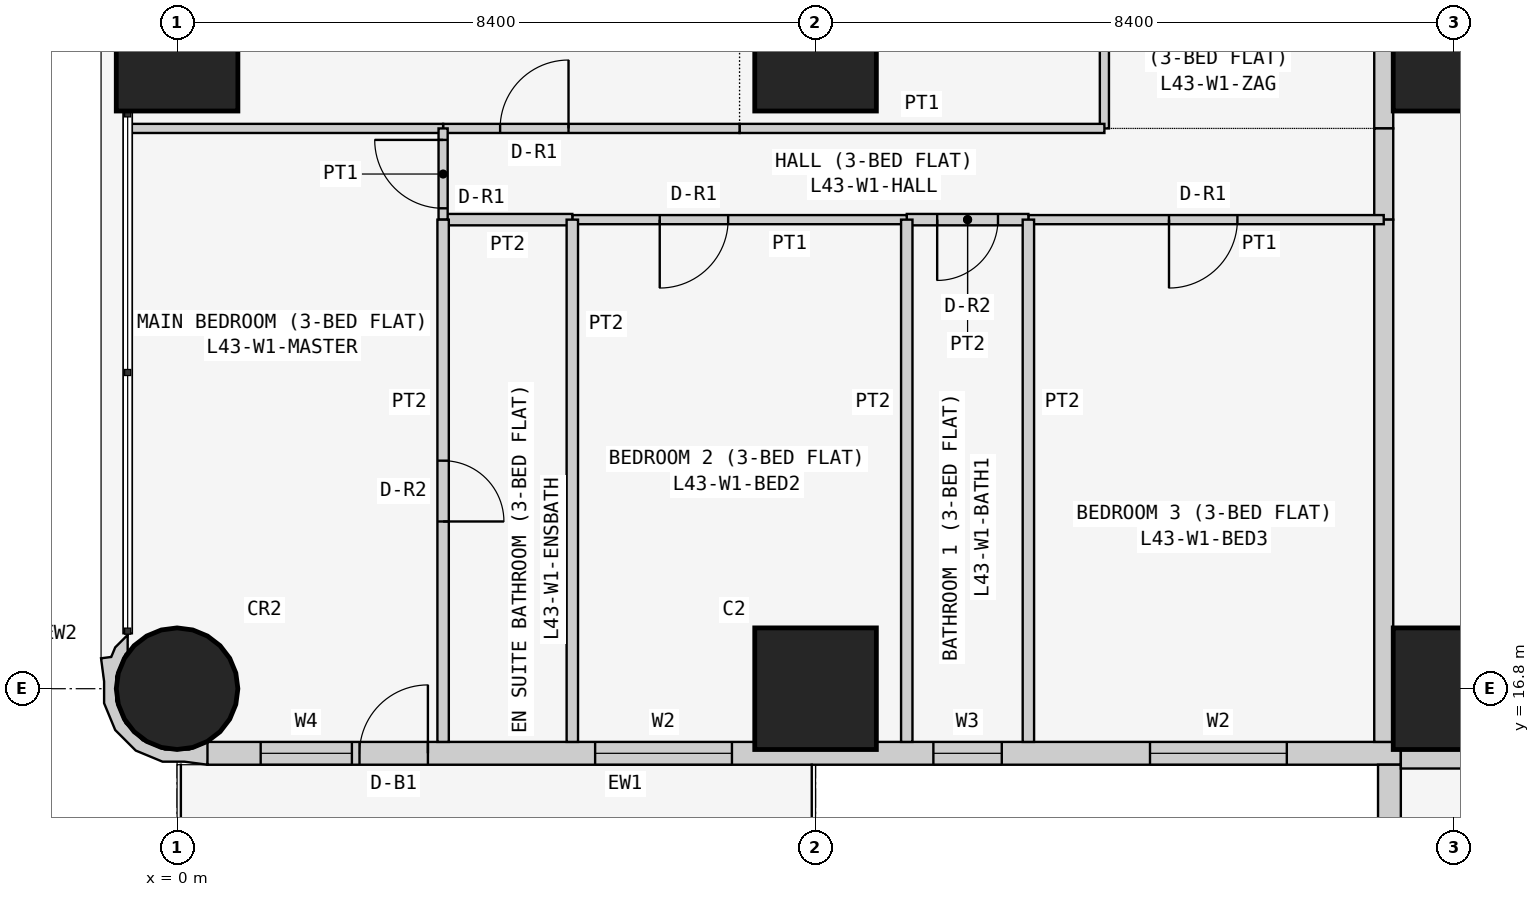
"""IFC4 building model, lengths in metres.
Left out: names, types, materials, properties, quantities, classifications, styles, units other than length and angle.
Written with IfcOpenShell. Run it as: python <this file> out.ifc"""

import sys

from ifc_helpers import new_model, si_unit, direction, frame, frame_2d, origin, origin_2d, place, context, subcontext, project, spatial, polyline, rectangle, circle, outline, extrude, element, fill, save


model = new_model("IFC4")
c1 = context("Model", 3, precision=1e-05, world=origin(), true_north=direction((0.0, 1.0)))
c2 = subcontext(c1, "Body", "Model", "MODEL_VIEW")
j1 = project(units=[si_unit("LENGTHUNIT", "METRE"), si_unit("PLANEANGLEUNIT", "RADIAN")], contexts=[c1])
p1 = place(None, origin())
s1 = spatial("IfcSite", under=j1, at=p1, CompositionType="ELEMENT")
p2 = place(p1, origin())
s2 = spatial("IfcBuilding", under=s1, at=p2, CompositionType="ELEMENT")
p3 = place(p2, frame((0.0, 0.0, 166.5)))
s3 = spatial("IfcBuildingStorey", under=s2, at=p3, CompositionType="ELEMENT", Elevation=166.5)
p4 = place(p3, frame((0.0, 16.8, 0.0), z_axis=(0.0, 0.0, 1.0), x_axis=(1.0, 0.0, 0.0)))
e1 = element("IfcColumn", 1, at=p4, inside=s3, PredefinedType="COLUMN", context=c2, shape_type="SweptSolid", body=[
    extrude(circle(Radius=0.8, at=origin_2d()), origin(), (0.0, 0.0, 1.0), 3.6),
])
for number, where, z_axis, x_axis in (
    (2, (0.0, 25.2, 0.0), (0.0, 0.0, 1.0), (1.0, 0.0, 0.0)),
    (3, (8.4, 16.8, 0.0), (0.0, 0.0, 1.0), (1.0, 0.0, 0.0)),
    (4, (8.4, 25.2, 0.0), (0.0, 0.0, 1.0), (1.0, 0.0, 0.0)),
    (5, (16.8, 16.8, 0.0), (0.0, 0.0, 1.0), (1.0, 0.0, 0.0)),
    (6, (16.8, 25.2, 0.0), (0.0, 0.0, 1.0), (1.0, 0.0, 0.0)),
):
    element("IfcColumn", number, at=place(p3, frame(where, z_axis=z_axis, x_axis=x_axis)), inside=s3, PredefinedType="COLUMN", context=c2, shape_type="SweptSolid", body=[
        extrude(rectangle(XDim=1.6, YDim=1.6, at=origin_2d()), origin(), (0.0, 0.0, 1.0), 3.6),
    ])
p5 = place(p3, frame((0.4, 15.95, 0.0), z_axis=(0.0, 0.0, 1.0), x_axis=(1.0, 0.0, 0.0)))
e7 = element("IfcWall", 7, at=p5, inside=s3, PredefinedType="SOLIDWALL", context=c2, shape_type="SweptSolid", body=[
    extrude(rectangle(XDim=15.7, YDim=0.3, at=frame_2d((7.85, 0.0))), origin(), (0.0, 0.0, 1.0), 3.45),
])
p6 = place(p5, frame((12.4, 0.0, 0.9)))
e8 = element("IfcOpeningElement", 8, at=p6, cuts=e7, PredefinedType="OPENING", context=c2, shape_type="SweptSolid", body=[
    extrude(rectangle(XDim=1.8, YDim=1.5, at=frame_2d((0.9, 0.75))), frame((0.0, 0.16, 0.0), z_axis=(0.0, -1.0, 0.0), x_axis=(1.0, 0.0, 0.0)), (0.0, 0.0, 1.0), 0.32),
])
p7 = place(p5, frame((9.55, 0.0, 1.5)))
e9 = element("IfcOpeningElement", 9, at=p7, cuts=e7, PredefinedType="OPENING", context=c2, shape_type="SweptSolid", body=[
    extrude(rectangle(XDim=0.9, YDim=0.7, at=frame_2d((0.45, 0.35))), frame((0.0, 0.16, 0.0), z_axis=(0.0, -1.0, 0.0), x_axis=(1.0, 0.0, 0.0)), (0.0, 0.0, 1.0), 0.32),
])
p8 = place(p5, frame((5.1, 0.0, 0.9)))
e10 = element("IfcOpeningElement", 10, at=p8, cuts=e7, PredefinedType="OPENING", context=c2, shape_type="SweptSolid", body=[
    extrude(rectangle(XDim=1.8, YDim=1.5, at=frame_2d((0.9, 0.75))), frame((0.0, 0.16, 0.0), z_axis=(0.0, -1.0, 0.0), x_axis=(1.0, 0.0, 0.0)), (0.0, 0.0, 1.0), 0.32),
])
p9 = place(p5, frame((2.0, 0.0, 0.0)))
e11 = element("IfcOpeningElement", 11, at=p9, cuts=e7, PredefinedType="OPENING", context=c2, shape_type="SweptSolid", body=[
    extrude(rectangle(XDim=0.9, YDim=2.4, at=frame_2d((0.45, 1.2))), frame((0.0, 0.16, 0.0), z_axis=(0.0, -1.0, 0.0), x_axis=(1.0, 0.0, 0.0)), (0.0, 0.0, 1.0), 0.32),
])
p10 = place(p5, frame((0.7, 0.0, 0.9)))
e12 = element("IfcOpeningElement", 12, at=p10, cuts=e7, PredefinedType="OPENING", context=c2, shape_type="SweptSolid", body=[
    extrude(rectangle(XDim=1.2, YDim=1.5, at=frame_2d((0.6, 0.75))), frame((0.0, 0.16, 0.0), z_axis=(0.0, -1.0, 0.0), x_axis=(1.0, 0.0, 0.0)), (0.0, 0.0, 1.0), 0.32),
])
p11 = place(p3, frame((15.95, 15.8, 0.0), z_axis=(0.0, 0.0, 1.0), x_axis=(0.0, -1.0, 0.0)))
e13 = element("IfcWall", 13, at=p11, inside=s3, PredefinedType="SOLIDWALL", context=c2, shape_type="SweptSolid", body=[
    extrude(rectangle(XDim=7.0, YDim=0.3, at=frame_2d((3.5, 0.0))), origin(), (0.0, 0.0, 1.0), 3.45),
])
p12 = place(p11, frame((1.5, 0.0, 0.9)))
e14 = element("IfcOpeningElement", 14, at=p12, cuts=e13, PredefinedType="OPENING", context=c2, shape_type="SweptSolid", body=[
    extrude(rectangle(XDim=2.4, YDim=1.5, at=frame_2d((1.2, 0.75))), frame((0.0, 0.16, 0.0), z_axis=(0.0, -1.0, 0.0), x_axis=(1.0, 0.0, 0.0)), (0.0, 0.0, 1.0), 0.32),
])
p13 = place(p11, frame((5.05, 0.0, 0.9)))
e15 = element("IfcOpeningElement", 15, at=p13, cuts=e13, PredefinedType="OPENING", context=c2, shape_type="SweptSolid", body=[
    extrude(rectangle(XDim=1.2, YDim=1.5, at=frame_2d((0.6, 0.75))), frame((0.0, 0.16, 0.0), z_axis=(0.0, -1.0, 0.0), x_axis=(1.0, 0.0, 0.0)), (0.0, 0.0, 1.0), 0.32),
])
p14 = place(p3, frame((-0.595, 17.448, 0.0), z_axis=(0.0, 0.0, 1.0), x_axis=(-0.93923434088, -0.343276641956, 0.0)))
e16 = element("IfcWall", 16, at=p14, inside=s3, PredefinedType="SOLIDWALL", context=c2, shape_type="SweptSolid", body=[
    extrude(outline(polyline([(-0.369, 1.89), (-0.509, 1.621), (-0.491, 1.614), (-0.479, 1.609), (-0.211, 1.62), (0.088, 1.511), (0.323, 1.295), (0.457, 1.006), (0.47, 0.688), (0.361, 0.389), (0.146, 0.154), (0.108, 0.137), (0.031, -0.075), (0.241, 0.023), (0.334, 0.124), (0.465, 0.094), (0.532, 0.393), (0.631, 0.663), (0.614, 1.045), (0.453, 1.391), (0.172, 1.649), (-0.098, 1.748), (-0.369, 1.89)])), origin(), (0.0, 0.0, 1.0), 3.45),
])
p15 = place(p3, frame((22.571, 15.875, 0.0), z_axis=(0.0, 0.0, 1.0), x_axis=(-1.0, 0.0, 0.0)))
e17 = element("IfcWall", 17, at=p15, inside=s3, PredefinedType="PARTITIONING", context=c2, shape_type="SweptSolid", body=[
    extrude(rectangle(XDim=6.471, YDim=0.25, at=frame_2d((3.235, 0.0))), origin(), (0.0, 0.0, 1.0), 3.45),
])
p16 = place(p3, frame((15.875, 24.171, 0.0), z_axis=(0.0, 0.0, 1.0), x_axis=(0.0, 1.0, 0.0)))
e18 = element("IfcWall", 18, at=p16, inside=s3, PredefinedType="PARTITIONING", context=c2, shape_type="SweptSolid", body=[
    extrude(rectangle(XDim=5.229, YDim=0.25, at=frame_2d((2.615, 0.0))), origin(), (0.0, 0.0, 1.0), 3.45),
])
p17 = place(p16, frame((2.129, 0.0, 0.0)))
e19 = element("IfcOpeningElement", 19, at=p17, cuts=e18, PredefinedType="OPENING", context=c2, shape_type="SweptSolid", body=[
    extrude(rectangle(XDim=1.0, YDim=2.1, at=frame_2d((0.5, 1.05))), frame((0.0, 0.135, 0.0), z_axis=(0.0, -1.0, 0.0), x_axis=(1.0, 0.0, 0.0)), (0.0, 0.0, 1.0), 0.27),
])
p18 = place(p3, frame((15.875, 22.971, 0.0), z_axis=(0.0, 0.0, 1.0), x_axis=(0.0, 1.0, 0.0)))
e20 = element("IfcWall", 20, at=p18, inside=s3, PredefinedType="PARTITIONING", context=c2, shape_type="SweptSolid", body=[
    extrude(rectangle(XDim=1.2, YDim=0.25, at=frame_2d((0.6, 0.0))), origin(), (0.0, 0.0, 1.0), 3.45),
])
p19 = place(p3, frame((15.875, 16.1, 0.0), z_axis=(0.0, 0.0, 1.0), x_axis=(0.0, 1.0, 0.0)))
e21 = element("IfcWall", 21, at=p19, inside=s3, PredefinedType="PARTITIONING", context=c2, shape_type="SweptSolid", body=[
    extrude(rectangle(XDim=6.871, YDim=0.25, at=frame_2d((3.436, 0.0))), origin(), (0.0, 0.0, 1.0), 3.45),
])
p20 = place(p3, frame((12.2, 29.4, 0.0), z_axis=(0.0, 0.0, 1.0), x_axis=(0.0, -1.0, 0.0)))
e22 = element("IfcWall", 22, at=p20, inside=s3, PredefinedType="PARTITIONING", context=c2, shape_type="SweptSolid", body=[
    extrude(rectangle(XDim=5.229, YDim=0.12, at=frame_2d((2.615, 0.0))), origin(), (0.0, 0.0, 1.0), 3.45),
])
p21 = place(p20, frame((1.05, 0.0, 0.0)))
e23 = element("IfcOpeningElement", 23, at=p21, cuts=e22, PredefinedType="OPENING", context=c2, shape_type="SweptSolid", body=[
    extrude(rectangle(XDim=0.9, YDim=2.1, at=frame_2d((0.45, 1.05))), frame((0.0, 0.07, 0.0), z_axis=(0.0, -1.0, 0.0), x_axis=(1.0, 0.0, 0.0)), (0.0, 0.0, 1.0), 0.14),
])
p22 = place(p3, frame((7.4, 24.171, 0.0), z_axis=(0.0, 0.0, 1.0), x_axis=(1.0, 0.0, 0.0)))
e24 = element("IfcWall", 24, at=p22, inside=s3, PredefinedType="PARTITIONING", context=c2, shape_type="SweptSolid", body=[
    extrude(rectangle(XDim=4.8, YDim=0.12, at=frame_2d((2.4, 0.0))), origin(), (0.0, 0.0, 1.0), 3.45),
])
p23 = place(p3, frame((3.5, 24.171, 0.0), z_axis=(0.0, 0.0, 1.0), x_axis=(1.0, 0.0, 0.0)))
e25 = element("IfcWall", 25, at=p23, inside=s3, PredefinedType="PARTITIONING", context=c2, shape_type="SweptSolid", body=[
    extrude(rectangle(XDim=3.9, YDim=0.12, at=frame_2d((1.95, 0.0))), origin(), (0.0, 0.0, 1.0), 3.45),
])
p24 = place(p23, frame((0.75, 0.0, 0.0)))
e26 = element("IfcOpeningElement", 26, at=p24, cuts=e25, PredefinedType="OPENING", context=c2, shape_type="SweptSolid", body=[
    extrude(rectangle(XDim=0.9, YDim=2.1, at=frame_2d((0.45, 1.05))), frame((0.0, 0.07, 0.0), z_axis=(0.0, -1.0, 0.0), x_axis=(1.0, 0.0, 0.0)), (0.0, 0.0, 1.0), 0.14),
])
p25 = place(p3, frame((-0.65, 24.171, 0.0), z_axis=(0.0, 0.0, 1.0), x_axis=(1.0, 0.0, 0.0)))
e27 = element("IfcWall", 27, at=p25, inside=s3, PredefinedType="PARTITIONING", context=c2, shape_type="SweptSolid", body=[
    extrude(rectangle(XDim=4.15, YDim=0.12, at=frame_2d((2.075, 0.0))), origin(), (0.0, 0.0, 1.0), 3.45),
])
p26 = place(p3, frame((11.2, 22.971, 0.0), z_axis=(0.0, 0.0, 1.0), x_axis=(1.0, 0.0, 0.0)))
e28 = element("IfcWall", 28, at=p26, inside=s3, PredefinedType="PARTITIONING", context=c2, shape_type="SweptSolid", body=[
    extrude(rectangle(XDim=4.675, YDim=0.12, at=frame_2d((2.337, 0.0))), origin(), (0.0, 0.0, 1.0), 3.45),
])
p27 = place(p26, frame((1.85, 0.0, 0.0)))
e29 = element("IfcOpeningElement", 29, at=p27, cuts=e28, PredefinedType="OPENING", context=c2, shape_type="SweptSolid", body=[
    extrude(rectangle(XDim=0.9, YDim=2.1, at=frame_2d((0.45, 1.05))), frame((0.0, 0.07, 0.0), z_axis=(0.0, -1.0, 0.0), x_axis=(1.0, 0.0, 0.0)), (0.0, 0.0, 1.0), 0.14),
])
p28 = place(p3, frame((9.6, 22.971, 0.0), z_axis=(0.0, 0.0, 1.0), x_axis=(1.0, 0.0, 0.0)))
e30 = element("IfcWall", 30, at=p28, inside=s3, PredefinedType="PARTITIONING", context=c2, shape_type="SweptSolid", body=[
    extrude(rectangle(XDim=1.6, YDim=0.15, at=frame_2d((0.8, 0.0))), origin(), (0.0, 0.0, 1.0), 3.45),
])
p29 = place(p28, frame((0.4, 0.0, 0.0)))
e31 = element("IfcOpeningElement", 31, at=p29, cuts=e30, PredefinedType="OPENING", context=c2, shape_type="SweptSolid", body=[
    extrude(rectangle(XDim=0.8, YDim=2.1, at=frame_2d((0.4, 1.05))), frame((0.0, 0.085, 0.0), z_axis=(0.0, -1.0, 0.0), x_axis=(1.0, 0.0, 0.0)), (0.0, 0.0, 1.0), 0.17),
])
p30 = place(p3, frame((5.2, 22.971, 0.0), z_axis=(0.0, 0.0, 1.0), x_axis=(1.0, 0.0, 0.0)))
e32 = element("IfcWall", 32, at=p30, inside=s3, PredefinedType="PARTITIONING", context=c2, shape_type="SweptSolid", body=[
    extrude(rectangle(XDim=4.4, YDim=0.12, at=frame_2d((2.2, 0.0))), origin(), (0.0, 0.0, 1.0), 3.45),
])
p31 = place(p30, frame((1.15, 0.0, 0.0)))
e33 = element("IfcOpeningElement", 33, at=p31, cuts=e32, PredefinedType="OPENING", context=c2, shape_type="SweptSolid", body=[
    extrude(rectangle(XDim=0.9, YDim=2.1, at=frame_2d((0.45, 1.05))), frame((0.0, 0.07, 0.0), z_axis=(0.0, -1.0, 0.0), x_axis=(1.0, 0.0, 0.0)), (0.0, 0.0, 1.0), 0.14),
])
p32 = place(p3, frame((3.5, 22.971, 0.0), z_axis=(0.0, 0.0, 1.0), x_axis=(1.0, 0.0, 0.0)))
e34 = element("IfcWall", 34, at=p32, inside=s3, PredefinedType="PARTITIONING", context=c2, shape_type="SweptSolid", body=[
    extrude(rectangle(XDim=1.7, YDim=0.15, at=frame_2d((0.85, 0.0))), origin(), (0.0, 0.0, 1.0), 3.45),
])
p33 = place(p3, frame((3.5, 24.171, 0.0), z_axis=(0.0, 0.0, 1.0), x_axis=(0.0, -1.0, 0.0)))
e35 = element("IfcWall", 35, at=p33, inside=s3, PredefinedType="PARTITIONING", context=c2, shape_type="SweptSolid", body=[
    extrude(rectangle(XDim=1.2, YDim=0.12, at=frame_2d((0.6, 0.0))), origin(), (0.0, 0.0, 1.0), 3.45),
])
p34 = place(p33, frame((0.151, 0.0, 0.0)))
e36 = element("IfcOpeningElement", 36, at=p34, cuts=e35, PredefinedType="OPENING", context=c2, shape_type="SweptSolid", body=[
    extrude(rectangle(XDim=0.9, YDim=2.1, at=frame_2d((0.45, 1.05))), frame((0.0, 0.07, 0.0), z_axis=(0.0, -1.0, 0.0), x_axis=(1.0, 0.0, 0.0)), (0.0, 0.0, 1.0), 0.14),
])
for number, where, z_axis, x_axis in (
    (37, (11.2, 22.971, 0.0), (0.0, 0.0, 1.0), (0.0, -1.0, 0.0)),
    (38, (9.6, 22.971, 0.0), (0.0, 0.0, 1.0), (0.0, -1.0, 0.0)),
    (39, (5.2, 22.971, 0.0), (0.0, 0.0, 1.0), (0.0, -1.0, 0.0)),
):
    element("IfcWall", number, at=place(p3, frame(where, z_axis=z_axis, x_axis=x_axis)), inside=s3, PredefinedType="PARTITIONING", context=c2, shape_type="SweptSolid", body=[
        extrude(rectangle(XDim=6.871, YDim=0.15, at=frame_2d((3.436, 0.0))), origin(), (0.0, 0.0, 1.0), 3.45),
    ])
p35 = place(p3, frame((3.5, 22.971, 0.0), z_axis=(0.0, 0.0, 1.0), x_axis=(0.0, -1.0, 0.0)))
e40 = element("IfcWall", 40, at=p35, inside=s3, PredefinedType="PARTITIONING", context=c2, shape_type="SweptSolid", body=[
    extrude(rectangle(XDim=6.871, YDim=0.15, at=frame_2d((3.436, 0.0))), origin(), (0.0, 0.0, 1.0), 3.45),
])
p36 = place(p35, frame((3.171, 0.0, 0.0)))
e41 = element("IfcOpeningElement", 41, at=p36, cuts=e40, PredefinedType="OPENING", context=c2, shape_type="SweptSolid", body=[
    extrude(rectangle(XDim=0.8, YDim=2.1, at=frame_2d((0.4, 1.05))), frame((0.0, 0.085, 0.0), z_axis=(0.0, -1.0, 0.0), x_axis=(1.0, 0.0, 0.0)), (0.0, 0.0, 1.0), 0.17),
])
p37 = place(p6, origin())
e42 = element("IfcWindow", 42, at=p37, inside=s3, PartitioningType="SINGLE_PANEL", PredefinedType="WINDOW", context=c2, shape_type="SweptSolid", body=[
    extrude(rectangle(XDim=1.8, YDim=1.5, at=frame_2d((0.9, 0.75))), frame((0.0, 0.03, 0.0), z_axis=(0.0, -1.0, 0.0), x_axis=(1.0, 0.0, 0.0)), (0.0, 0.0, 1.0), 0.06),
])
fill(e8, e42)
p38 = place(p7, origin())
e43 = element("IfcWindow", 43, at=p38, inside=s3, PartitioningType="SINGLE_PANEL", PredefinedType="WINDOW", context=c2, shape_type="SweptSolid", body=[
    extrude(rectangle(XDim=0.9, YDim=0.7, at=frame_2d((0.45, 0.35))), frame((0.0, 0.03, 0.0), z_axis=(0.0, -1.0, 0.0), x_axis=(1.0, 0.0, 0.0)), (0.0, 0.0, 1.0), 0.06),
])
fill(e9, e43)
p39 = place(p8, origin())
e44 = element("IfcWindow", 44, at=p39, inside=s3, PartitioningType="SINGLE_PANEL", PredefinedType="WINDOW", context=c2, shape_type="SweptSolid", body=[
    extrude(rectangle(XDim=1.8, YDim=1.5, at=frame_2d((0.9, 0.75))), frame((0.0, 0.03, 0.0), z_axis=(0.0, -1.0, 0.0), x_axis=(1.0, 0.0, 0.0)), (0.0, 0.0, 1.0), 0.06),
])
fill(e10, e44)
p40 = place(p9, origin())
e45 = element("IfcDoor", 45, at=p40, inside=s3, OperationType="SINGLE_SWING_RIGHT", PredefinedType="DOOR", context=c2, shape_type="SweptSolid", body=[
    extrude(rectangle(XDim=0.9, YDim=2.4, at=frame_2d((0.45, 1.2))), frame((0.0, 0.025, 0.0), z_axis=(0.0, -1.0, 0.0), x_axis=(1.0, 0.0, 0.0)), (0.0, 0.0, 1.0), 0.05),
])
fill(e11, e45)
p41 = place(p10, origin())
e46 = element("IfcWindow", 46, at=p41, inside=s3, PartitioningType="SINGLE_PANEL", PredefinedType="WINDOW", context=c2, shape_type="SweptSolid", body=[
    extrude(rectangle(XDim=1.2, YDim=1.5, at=frame_2d((0.6, 0.75))), frame((0.0, 0.03, 0.0), z_axis=(0.0, -1.0, 0.0), x_axis=(1.0, 0.0, 0.0)), (0.0, 0.0, 1.0), 0.06),
])
fill(e12, e46)
p42 = place(p24, origin())
e47 = element("IfcDoor", 47, at=p42, inside=s3, OperationType="SINGLE_SWING_RIGHT", PredefinedType="DOOR", context=c2, shape_type="SweptSolid", body=[
    extrude(rectangle(XDim=0.9, YDim=2.1, at=frame_2d((0.45, 1.05))), frame((0.0, 0.025, 0.0), z_axis=(0.0, -1.0, 0.0), x_axis=(1.0, 0.0, 0.0)), (0.0, 0.0, 1.0), 0.05),
])
fill(e26, e47)
p43 = place(p27, frame((0.9, 0.0, 0.0), z_axis=(0.0, 0.0, 1.0), x_axis=(-1.0, 0.0, 0.0)))
e48 = element("IfcDoor", 48, at=p43, inside=s3, OperationType="SINGLE_SWING_RIGHT", PredefinedType="DOOR", context=c2, shape_type="SweptSolid", body=[
    extrude(rectangle(XDim=0.9, YDim=2.1, at=frame_2d((0.45, 1.05))), frame((0.0, 0.025, 0.0), z_axis=(0.0, -1.0, 0.0), x_axis=(1.0, 0.0, 0.0)), (0.0, 0.0, 1.0), 0.05),
])
fill(e29, e48)
p44 = place(p29, frame((0.8, 0.0, 0.0), z_axis=(0.0, 0.0, 1.0), x_axis=(-1.0, 0.0, 0.0)))
e49 = element("IfcDoor", 49, at=p44, inside=s3, OperationType="SINGLE_SWING_RIGHT", PredefinedType="DOOR", context=c2, shape_type="SweptSolid", body=[
    extrude(rectangle(XDim=0.8, YDim=2.1, at=frame_2d((0.4, 1.05))), frame((0.0, 0.025, 0.0), z_axis=(0.0, -1.0, 0.0), x_axis=(1.0, 0.0, 0.0)), (0.0, 0.0, 1.0), 0.05),
])
fill(e31, e49)
p45 = place(p31, frame((0.9, 0.0, 0.0), z_axis=(0.0, 0.0, 1.0), x_axis=(-1.0, 0.0, 0.0)))
e50 = element("IfcDoor", 50, at=p45, inside=s3, OperationType="SINGLE_SWING_RIGHT", PredefinedType="DOOR", context=c2, shape_type="SweptSolid", body=[
    extrude(rectangle(XDim=0.9, YDim=2.1, at=frame_2d((0.45, 1.05))), frame((0.0, 0.025, 0.0), z_axis=(0.0, -1.0, 0.0), x_axis=(1.0, 0.0, 0.0)), (0.0, 0.0, 1.0), 0.05),
])
fill(e33, e50)
p46 = place(p34, frame((0.9, 0.0, 0.0), z_axis=(0.0, 0.0, 1.0), x_axis=(-1.0, 0.0, 0.0)))
e51 = element("IfcDoor", 51, at=p46, inside=s3, OperationType="SINGLE_SWING_RIGHT", PredefinedType="DOOR", context=c2, shape_type="SweptSolid", body=[
    extrude(rectangle(XDim=0.9, YDim=2.1, at=frame_2d((0.45, 1.05))), frame((0.0, 0.025, 0.0), z_axis=(0.0, -1.0, 0.0), x_axis=(1.0, 0.0, 0.0)), (0.0, 0.0, 1.0), 0.05),
])
fill(e36, e51)
p47 = place(p36, origin())
e52 = element("IfcDoor", 52, at=p47, inside=s3, OperationType="SINGLE_SWING_RIGHT", PredefinedType="DOOR", context=c2, shape_type="SweptSolid", body=[
    extrude(rectangle(XDim=0.8, YDim=2.1, at=frame_2d((0.4, 1.05))), frame((0.0, 0.025, 0.0), z_axis=(0.0, -1.0, 0.0), x_axis=(1.0, 0.0, 0.0)), (0.0, 0.0, 1.0), 0.05),
])
fill(e41, e52)
save(model, sys.argv[1])
